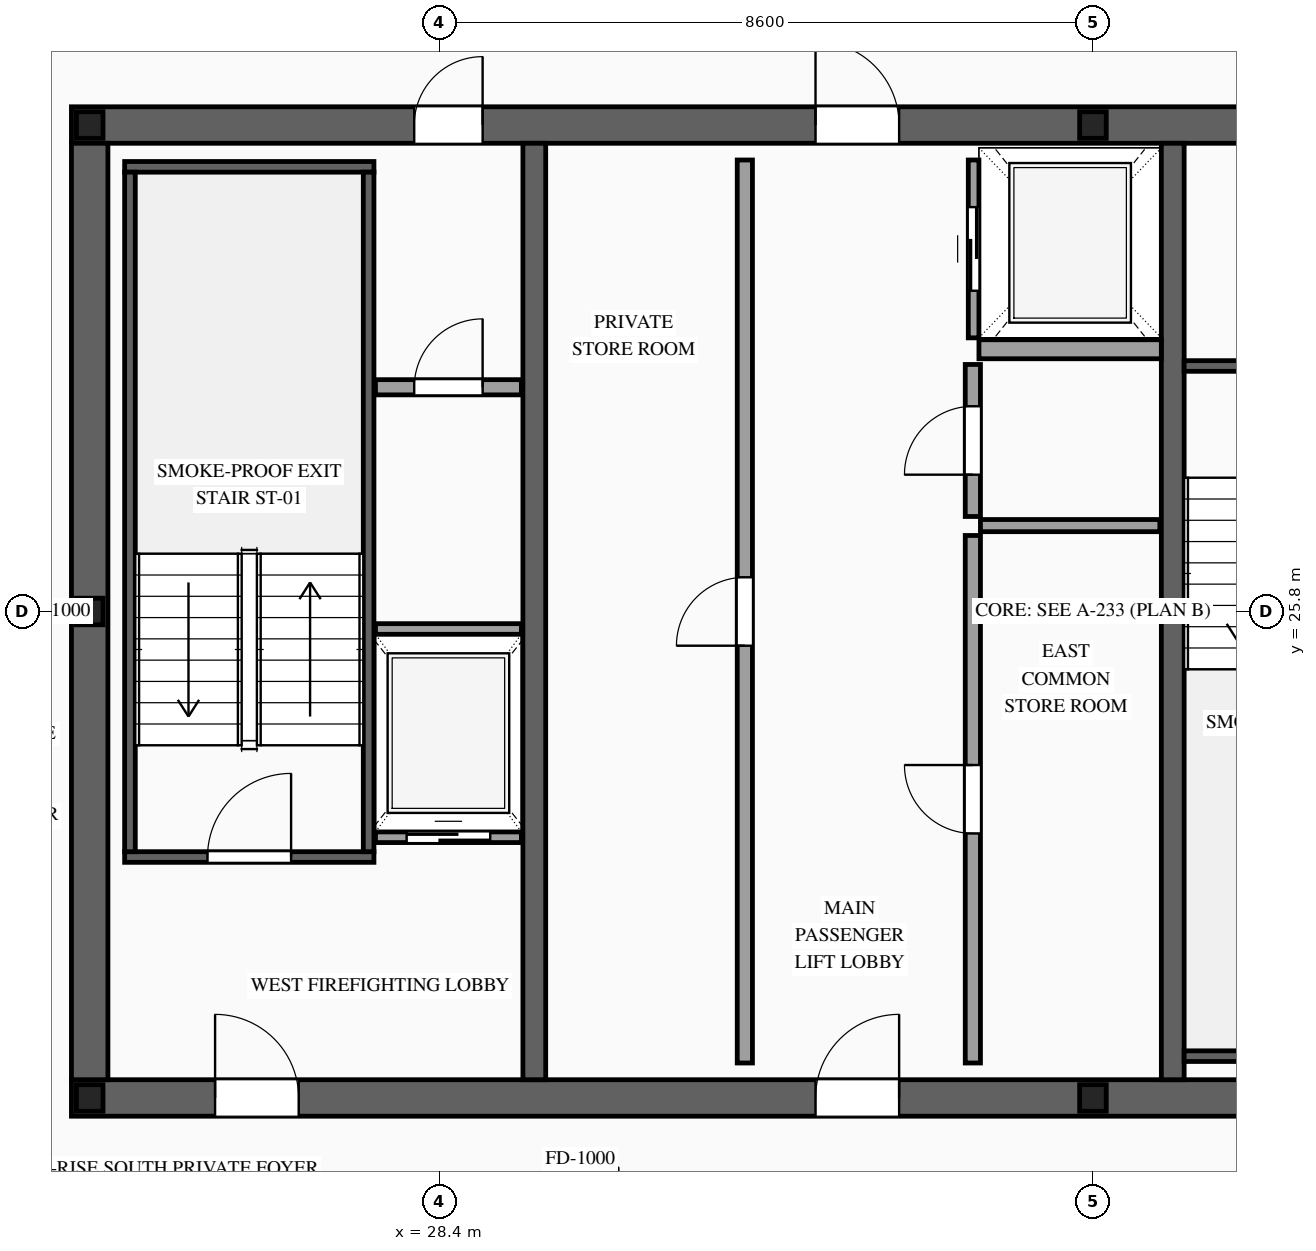
"""IFC4 building model, lengths in metres.
Left out: names, types, materials, properties, quantities, classifications, styles, units other than length and angle.
Written with IfcOpenShell. Run it as: python <this file> out.ifc"""

import sys

from ifc_helpers import new_model, si_unit, direction, frame, frame_2d, origin, origin_2d, place, context, subcontext, project, spatial, rectangle, i_section, extrude, source, transform, mapped, element, fill, save


model = new_model("IFC4")
c1 = context("Model", 3, precision=1e-05, world=origin(), true_north=direction((0.0, 1.0)))
c2 = subcontext(c1, "Body", "Model", "MODEL_VIEW")
j1 = project(units=[si_unit("LENGTHUNIT", "METRE"), si_unit("PLANEANGLEUNIT", "RADIAN")], contexts=[c1])
p1 = place(None, origin())
s1 = spatial("IfcSite", under=j1, at=p1, CompositionType="ELEMENT")
p2 = place(p1, origin())
s2 = spatial("IfcBuilding", under=s1, at=p2, CompositionType="ELEMENT")
p3 = place(p2, frame((0.0, 0.0, 328.7)))
s3 = spatial("IfcBuildingStorey", under=s2, at=p3, CompositionType="ELEMENT", Elevation=328.7)
p4 = place(p3, frame((23.56, 19.4, 0.0), z_axis=(0.0, 0.0, 1.0), x_axis=(1.0, 0.0, 0.0)))
e1 = element("IfcWall", 1, at=p4, inside=s3, PredefinedType="SHEAR", context=c2, shape_type="SweptSolid", body=[
    extrude(rectangle(XDim=26.88, YDim=0.48, at=frame_2d((13.44, 0.0))), origin(), (0.0, 0.0, 1.0), 3.5),
])
p5 = place(p4, frame((1.89, 0.0, 0.0)))
e2 = element("IfcOpeningElement", 2, at=p5, cuts=e1, PredefinedType="OPENING", context=c2, shape_type="SweptSolid", body=[
    extrude(rectangle(XDim=1.1, YDim=2.2, at=frame_2d((0.55, 1.1))), frame((0.0, 0.255, 0.0), z_axis=(0.0, -1.0, 0.0), x_axis=(1.0, 0.0, 0.0)), (0.0, 0.0, 1.0), 0.51),
])
p6 = place(p4, frame((9.79, 0.0, 0.0)))
e3 = element("IfcOpeningElement", 3, at=p6, cuts=e1, PredefinedType="OPENING", context=c2, shape_type="SweptSolid", body=[
    extrude(rectangle(XDim=1.1, YDim=2.2, at=frame_2d((0.55, 1.1))), frame((0.0, 0.255, 0.0), z_axis=(0.0, -1.0, 0.0), x_axis=(1.0, 0.0, 0.0)), (0.0, 0.0, 1.0), 0.51),
])
p7 = place(p4, frame((22.99, 0.0, 0.0)))
e4 = element("IfcOpeningElement", 4, at=p7, cuts=e1, PredefinedType="OPENING", context=c2, shape_type="SweptSolid", body=[
    extrude(rectangle(XDim=1.1, YDim=2.2, at=frame_2d((0.55, 1.1))), frame((0.0, 0.255, 0.0), z_axis=(0.0, -1.0, 0.0), x_axis=(1.0, 0.0, 0.0)), (0.0, 0.0, 1.0), 0.51),
])
p8 = place(p4, frame((19.61, 0.0, 0.0)))
e5 = element("IfcOpeningElement", 5, at=p8, cuts=e1, PredefinedType="OPENING", context=c2, shape_type="SweptSolid", body=[
    extrude(rectangle(XDim=0.9, YDim=2.15, at=frame_2d((0.45, 1.075))), frame((0.0, 0.255, 0.0), z_axis=(0.0, -1.0, 0.0), x_axis=(1.0, 0.0, 0.0)), (0.0, 0.0, 1.0), 0.51),
])
p9 = place(p4, frame((18.17, 0.0, 0.0)))
e6 = element("IfcOpeningElement", 6, at=p9, cuts=e1, PredefinedType="OPENING", context=c2, shape_type="SweptSolid", body=[
    extrude(rectangle(XDim=0.9, YDim=2.15, at=frame_2d((0.45, 1.075))), frame((0.0, 0.255, 0.0), z_axis=(0.0, -1.0, 0.0), x_axis=(1.0, 0.0, 0.0)), (0.0, 0.0, 1.0), 0.51),
])
p10 = place(p3, frame((23.56, 32.2, 0.0), z_axis=(0.0, 0.0, 1.0), x_axis=(1.0, 0.0, 0.0)))
e7 = element("IfcWall", 7, at=p10, inside=s3, PredefinedType="SHEAR", context=c2, shape_type="SweptSolid", body=[
    extrude(rectangle(XDim=26.88, YDim=0.48, at=frame_2d((13.44, 0.0))), origin(), (0.0, 0.0, 1.0), 3.5),
])
p11 = place(p10, frame((4.51, 0.0, 0.0)))
e8 = element("IfcOpeningElement", 8, at=p11, cuts=e7, PredefinedType="OPENING", context=c2, shape_type="SweptSolid", body=[
    extrude(rectangle(XDim=0.9, YDim=2.15, at=frame_2d((0.45, 1.075))), frame((0.0, 0.255, 0.0), z_axis=(0.0, -1.0, 0.0), x_axis=(1.0, 0.0, 0.0)), (0.0, 0.0, 1.0), 0.51),
])
p12 = place(p10, frame((9.79, 0.0, 0.0)))
e9 = element("IfcOpeningElement", 9, at=p12, cuts=e7, PredefinedType="OPENING", context=c2, shape_type="SweptSolid", body=[
    extrude(rectangle(XDim=1.1, YDim=2.2, at=frame_2d((0.55, 1.1))), frame((0.0, 0.255, 0.0), z_axis=(0.0, -1.0, 0.0), x_axis=(1.0, 0.0, 0.0)), (0.0, 0.0, 1.0), 0.51),
])
p13 = place(p10, frame((15.64, 0.0, 0.0)))
e10 = element("IfcOpeningElement", 10, at=p13, cuts=e7, PredefinedType="OPENING", context=c2, shape_type="SweptSolid", body=[
    extrude(rectangle(XDim=1.1, YDim=2.2, at=frame_2d((0.55, 1.1))), frame((0.0, 0.255, 0.0), z_axis=(0.0, -1.0, 0.0), x_axis=(1.0, 0.0, 0.0)), (0.0, 0.0, 1.0), 0.51),
])
p14 = place(p10, frame((18.74, 0.0, 0.0)))
e11 = element("IfcOpeningElement", 11, at=p14, cuts=e7, PredefinedType="OPENING", context=c2, shape_type="SweptSolid", body=[
    extrude(rectangle(XDim=1.1, YDim=2.2, at=frame_2d((0.55, 1.1))), frame((0.0, 0.255, 0.0), z_axis=(0.0, -1.0, 0.0), x_axis=(1.0, 0.0, 0.0)), (0.0, 0.0, 1.0), 0.51),
])
m1 = source(origin(), c2, "Body", "SweptSolid", [
    extrude(rectangle(XDim=12.32, YDim=0.48, at=frame_2d((6.16, 0.0))), origin(), (0.0, 0.0, 1.0), 3.5),
])
p15 = place(p3, frame((23.8, 19.64, 0.0), z_axis=(0.0, 0.0, 1.0), x_axis=(0.0, 1.0, 0.0)))
e12 = element("IfcWall", 12, at=p15, inside=s3, PredefinedType="SHEAR", context=c2, shape_type="MappedRepresentation", body=[
    mapped(m1, transform((0.0, 0.0, 0.0), scale=1.0)),
])
m2 = source(origin(), c2, "Body", "SweptSolid", [
    extrude(rectangle(XDim=12.32, YDim=0.3, at=frame_2d((6.16, 0.0))), origin(), (0.0, 0.0, 1.0), 3.5),
])
for number, where, z_axis, x_axis in (
    (13, (29.65, 19.64, 0.0), (0.0, 0.0, 1.0), (0.0, 1.0, 0.0)),
    (14, (38.05, 19.64, 0.0), (0.0, 0.0, 1.0), (0.0, 1.0, 0.0)),
):
    element("IfcWall", number, at=place(p3, frame(where, z_axis=z_axis, x_axis=x_axis)), inside=s3, PredefinedType="SOLIDWALL", context=c2, shape_type="MappedRepresentation", body=[
        mapped(m2, transform((0.0, 0.0, 0.0), scale=1.0)),
    ])
m3 = source(origin(), c2, "Body", "SweptSolid", [
    extrude(i_section(OverallWidth=0.35, OverallDepth=0.35, WebThickness=0.012, FlangeThickness=0.019, at=origin_2d()), origin(), (0.0, 0.0, 1.0), 3.5),
])
for number, where, z_axis, x_axis in (
    (15, (23.8, 19.4, 0.0), (0.0, 0.0, 1.0), (1.0, 0.0, 0.0)),
    (16, (37.0, 19.4, 0.0), (0.0, 0.0, 1.0), (1.0, 0.0, 0.0)),
    (17, (23.8, 25.8, 0.0), (0.0, 0.0, 1.0), (1.0, 0.0, 0.0)),
    (18, (23.8, 32.2, 0.0), (0.0, 0.0, 1.0), (1.0, 0.0, 0.0)),
    (19, (37.0, 32.2, 0.0), (0.0, 0.0, 1.0), (1.0, 0.0, 0.0)),
):
    element("IfcColumn", number, at=place(p3, frame(where, z_axis=z_axis, x_axis=x_axis)), inside=s3, PredefinedType="COLUMN", context=c2, shape_type="MappedRepresentation", body=[
        mapped(m3, transform((0.0, 0.0, 0.0), scale=1.0)),
    ])
p16 = place(p3, frame((27.56, 22.83, 0.0), z_axis=(0.0, 0.0, 1.0), x_axis=(1.0, 0.0, 0.0)))
e20 = element("IfcWall", 20, at=p16, inside=s3, PredefinedType="SOLIDWALL", context=c2, shape_type="SweptSolid", body=[
    extrude(rectangle(XDim=1.92, YDim=0.14, at=frame_2d((0.96, 0.0))), origin(), (0.0, 0.0, 1.0), 3.28),
])
p17 = place(p16, frame((0.41, 0.0, 0.0)))
e21 = element("IfcOpeningElement", 21, at=p17, cuts=e20, PredefinedType="OPENING", context=c2, shape_type="SweptSolid", body=[
    extrude(rectangle(XDim=1.1, YDim=2.2, at=frame_2d((0.55, 1.1))), frame((0.0, 0.085, 0.0), z_axis=(0.0, -1.0, 0.0), x_axis=(1.0, 0.0, 0.0)), (0.0, 0.0, 1.0), 0.17),
])
m4 = source(origin(), c2, "Body", "SweptSolid", [
    extrude(rectangle(XDim=1.92, YDim=0.14, at=frame_2d((0.96, 0.0))), origin(), (0.0, 0.0, 1.0), 3.28),
])
p18 = place(p3, frame((27.56, 25.57, 0.0), z_axis=(0.0, 0.0, 1.0), x_axis=(1.0, 0.0, 0.0)))
e22 = element("IfcWall", 22, at=p18, inside=s3, PredefinedType="SOLIDWALL", context=c2, shape_type="MappedRepresentation", body=[
    mapped(m4, transform((0.0, 0.0, 0.0), scale=1.0)),
])
p19 = place(p3, frame((35.43, 29.4, 0.0), z_axis=(0.0, 0.0, 1.0), x_axis=(0.0, 1.0, 0.0)))
e23 = element("IfcWall", 23, at=p19, inside=s3, PredefinedType="SOLIDWALL", context=c2, shape_type="SweptSolid", body=[
    extrude(rectangle(XDim=2.34, YDim=0.14, at=frame_2d((1.17, 0.0))), origin(), (0.0, 0.0, 1.0), 3.28),
])
p20 = place(p19, frame((0.62, 0.0, 0.0)))
e24 = element("IfcOpeningElement", 24, at=p20, cuts=e23, PredefinedType="OPENING", context=c2, shape_type="SweptSolid", body=[
    extrude(rectangle(XDim=1.1, YDim=2.2, at=frame_2d((0.55, 1.1))), frame((0.0, 0.085, 0.0), z_axis=(0.0, -1.0, 0.0), x_axis=(1.0, 0.0, 0.0)), (0.0, 0.0, 1.0), 0.17),
])
m5 = source(origin(), c2, "Body", "SweptSolid", [
    extrude(rectangle(XDim=2.4, YDim=0.25, at=frame_2d((1.2, 0.0))), origin(), (0.0, 0.0, 1.0), 3.28),
])
p21 = place(p3, frame((35.5, 29.25, 0.0), z_axis=(0.0, 0.0, 1.0), x_axis=(1.0, 0.0, 0.0)))
e25 = element("IfcWall", 25, at=p21, inside=s3, PredefinedType="SOLIDWALL", context=c2, shape_type="MappedRepresentation", body=[
    mapped(m5, transform((0.0, 0.0, 0.0), scale=1.0)),
])
p22 = place(p3, frame((24.26, 22.57, 0.0), z_axis=(0.0, 0.0, 1.0), x_axis=(1.0, 0.0, 0.0)))
e26 = element("IfcWall", 26, at=p22, inside=s3, PredefinedType="SOLIDWALL", context=c2, shape_type="SweptSolid", body=[
    extrude(rectangle(XDim=3.28, YDim=0.14, at=frame_2d((1.64, 0.0))), origin(), (0.0, 0.0, 1.0), 3.28),
])
p23 = place(p22, frame((1.09, 0.0, 0.0)))
e27 = element("IfcOpeningElement", 27, at=p23, cuts=e26, PredefinedType="OPENING", context=c2, shape_type="SweptSolid", body=[
    extrude(rectangle(XDim=1.1, YDim=2.2, at=frame_2d((0.55, 1.1))), frame((0.0, 0.085, 0.0), z_axis=(0.0, -1.0, 0.0), x_axis=(1.0, 0.0, 0.0)), (0.0, 0.0, 1.0), 0.17),
])
m6 = source(origin(), c2, "Body", "SweptSolid", [
    extrude(rectangle(XDim=3.28, YDim=0.14, at=frame_2d((1.64, 0.0))), origin(), (0.0, 0.0, 1.0), 3.28),
])
p24 = place(p3, frame((24.26, 31.65, 0.0), z_axis=(0.0, 0.0, 1.0), x_axis=(1.0, 0.0, 0.0)))
e28 = element("IfcWall", 28, at=p24, inside=s3, PredefinedType="SOLIDWALL", context=c2, shape_type="MappedRepresentation", body=[
    mapped(m6, transform((0.0, 0.0, 0.0), scale=1.0)),
])
m7 = source(origin(), c2, "Body", "SweptSolid", [
    extrude(rectangle(XDim=8.94, YDim=0.14, at=frame_2d((4.47, 0.0))), origin(), (0.0, 0.0, 1.0), 3.28),
])
for number, where, z_axis, x_axis in (
    (29, (24.33, 22.64, 0.0), (0.0, 0.0, 1.0), (0.0, 1.0, 0.0)),
    (30, (27.47, 22.64, 0.0), (0.0, 0.0, 1.0), (0.0, 1.0, 0.0)),
):
    element("IfcWall", number, at=place(p3, frame(where, z_axis=z_axis, x_axis=x_axis)), inside=s3, PredefinedType="SOLIDWALL", context=c2, shape_type="MappedRepresentation", body=[
        mapped(m7, transform((0.0, 0.0, 0.0), scale=1.0)),
    ])
p25 = place(p3, frame((38.2, 29.03, 0.0), z_axis=(0.0, 0.0, 1.0), x_axis=(1.0, 0.0, 0.0)))
e31 = element("IfcWall", 31, at=p25, inside=s3, PredefinedType="SOLIDWALL", context=c2, shape_type="SweptSolid", body=[
    extrude(rectangle(XDim=3.14, YDim=0.14, at=frame_2d((1.57, 0.0))), origin(), (0.0, 0.0, 1.0), 3.28),
])
p26 = place(p25, frame((1.02, 0.0, 0.0)))
e32 = element("IfcOpeningElement", 32, at=p26, cuts=e31, PredefinedType="OPENING", context=c2, shape_type="SweptSolid", body=[
    extrude(rectangle(XDim=1.1, YDim=2.2, at=frame_2d((0.55, 1.1))), frame((0.0, 0.085, 0.0), z_axis=(0.0, -1.0, 0.0), x_axis=(1.0, 0.0, 0.0)), (0.0, 0.0, 1.0), 0.17),
])
m8 = source(origin(), c2, "Body", "SweptSolid", [
    extrude(rectangle(XDim=3.14, YDim=0.14, at=frame_2d((1.57, 0.0))), origin(), (0.0, 0.0, 1.0), 3.28),
])
p27 = place(p3, frame((38.2, 19.95, 0.0), z_axis=(0.0, 0.0, 1.0), x_axis=(1.0, 0.0, 0.0)))
e33 = element("IfcWall", 33, at=p27, inside=s3, PredefinedType="SOLIDWALL", context=c2, shape_type="MappedRepresentation", body=[
    mapped(m8, transform((0.0, 0.0, 0.0), scale=1.0)),
])
p28 = place(p3, frame((27.56, 28.75, 0.0), z_axis=(0.0, 0.0, 1.0), x_axis=(1.0, 0.0, 0.0)))
e34 = element("IfcWall", 34, at=p28, inside=s3, PredefinedType="PARTITIONING", context=c2, shape_type="SweptSolid", body=[
    extrude(rectangle(XDim=1.92, YDim=0.2, at=frame_2d((0.96, 0.0))), origin(), (0.0, 0.0, 1.0), 3.28),
])
p29 = place(p28, frame((0.51, 0.0, 0.0)))
e35 = element("IfcOpeningElement", 35, at=p29, cuts=e34, PredefinedType="OPENING", context=c2, shape_type="SweptSolid", body=[
    extrude(rectangle(XDim=0.9, YDim=2.15, at=frame_2d((0.45, 1.075))), frame((0.0, 0.115, 0.0), z_axis=(0.0, -1.0, 0.0), x_axis=(1.0, 0.0, 0.0)), (0.0, 0.0, 1.0), 0.23),
])
p30 = place(p3, frame((32.42, 19.86, 0.0), z_axis=(0.0, 0.0, 1.0), x_axis=(0.0, 1.0, 0.0)))
e36 = element("IfcWall", 36, at=p30, inside=s3, PredefinedType="PARTITIONING", context=c2, shape_type="SweptSolid", body=[
    extrude(rectangle(XDim=11.88, YDim=0.2, at=frame_2d((5.94, 0.0))), origin(), (0.0, 0.0, 1.0), 3.28),
])
p31 = place(p30, frame((5.49, 0.0, 0.0)))
e37 = element("IfcOpeningElement", 37, at=p31, cuts=e36, PredefinedType="OPENING", context=c2, shape_type="SweptSolid", body=[
    extrude(rectangle(XDim=0.9, YDim=2.15, at=frame_2d((0.45, 1.075))), frame((0.0, 0.115, 0.0), z_axis=(0.0, -1.0, 0.0), x_axis=(1.0, 0.0, 0.0)), (0.0, 0.0, 1.0), 0.23),
])
p32 = place(p3, frame((35.42, 19.86, 0.0), z_axis=(0.0, 0.0, 1.0), x_axis=(0.0, 1.0, 0.0)))
e38 = element("IfcWall", 38, at=p32, inside=s3, PredefinedType="PARTITIONING", context=c2, shape_type="SweptSolid", body=[
    extrude(rectangle(XDim=6.94, YDim=0.2, at=frame_2d((3.47, 0.0))), origin(), (0.0, 0.0, 1.0), 3.28),
])
p33 = place(p32, frame((3.02, 0.0, 0.0)))
e39 = element("IfcOpeningElement", 39, at=p33, cuts=e38, PredefinedType="OPENING", context=c2, shape_type="SweptSolid", body=[
    extrude(rectangle(XDim=0.9, YDim=2.15, at=frame_2d((0.45, 1.075))), frame((0.0, 0.115, 0.0), z_axis=(0.0, -1.0, 0.0), x_axis=(1.0, 0.0, 0.0)), (0.0, 0.0, 1.0), 0.23),
])
p34 = place(p3, frame((35.42, 27.05, 0.0), z_axis=(0.0, 0.0, 1.0), x_axis=(0.0, 1.0, 0.0)))
e40 = element("IfcWall", 40, at=p34, inside=s3, PredefinedType="PARTITIONING", context=c2, shape_type="SweptSolid", body=[
    extrude(rectangle(XDim=2.0, YDim=0.2, at=frame_2d((1.0, 0.0))), origin(), (0.0, 0.0, 1.0), 3.28),
])
p35 = place(p34, frame((0.55, 0.0, 0.0)))
e41 = element("IfcOpeningElement", 41, at=p35, cuts=e40, PredefinedType="OPENING", context=c2, shape_type="SweptSolid", body=[
    extrude(rectangle(XDim=0.9, YDim=2.15, at=frame_2d((0.45, 1.075))), frame((0.0, 0.115, 0.0), z_axis=(0.0, -1.0, 0.0), x_axis=(1.0, 0.0, 0.0)), (0.0, 0.0, 1.0), 0.23),
])
m9 = source(origin(), c2, "Body", "SweptSolid", [
    extrude(rectangle(XDim=2.36, YDim=0.16, at=frame_2d((1.18, 0.0))), origin(), (0.0, 0.0, 1.0), 3.28),
])
p36 = place(p3, frame((35.52, 26.93, 0.0), z_axis=(0.0, 0.0, 1.0), x_axis=(1.0, 0.0, 0.0)))
e42 = element("IfcWall", 42, at=p36, inside=s3, PredefinedType="PARTITIONING", context=c2, shape_type="MappedRepresentation", body=[
    mapped(m9, transform((0.0, 0.0, 0.0), scale=1.0)),
])
m10 = source(origin(), c2, "Body", "SweptSolid", [
    extrude(rectangle(XDim=1.1, YDim=2.2, at=frame_2d((0.55, 1.1))), frame((0.0, 0.025, 0.0), z_axis=(0.0, -1.0, 0.0), x_axis=(1.0, 0.0, 0.0)), (0.0, 0.0, 1.0), 0.05),
])
p37 = place(p17, origin())
e43 = element("IfcDoor", 43, at=p37, inside=s3, OperationType="SLIDING_TO_LEFT", PredefinedType="DOOR", context=c2, shape_type="MappedRepresentation", body=[
    mapped(m10, transform((0.0, 0.0, 0.0), scale=1.0)),
])
fill(e21, e43)
p38 = place(p20, origin())
e44 = element("IfcDoor", 44, at=p38, inside=s3, OperationType="SLIDING_TO_RIGHT", PredefinedType="DOOR", context=c2, shape_type="MappedRepresentation", body=[
    mapped(m10, transform((0.0, 0.0, 0.0), scale=1.0)),
])
fill(e24, e44)
m11 = source(origin(), c2, "Body", "SweptSolid", [
    extrude(rectangle(XDim=1.1, YDim=2.2, at=frame_2d((0.55, 1.1))), frame((0.0, 0.025, 0.0), z_axis=(0.0, -1.0, 0.0), x_axis=(1.0, 0.0, 0.0)), (0.0, 0.0, 1.0), 0.05),
])
p39 = place(p23, origin())
e45 = element("IfcDoor", 45, at=p39, inside=s3, OperationType="SINGLE_SWING_RIGHT", PredefinedType="DOOR", context=c2, shape_type="MappedRepresentation", body=[
    mapped(m11, transform((0.0, 0.0, 0.0), scale=1.0)),
])
fill(e27, e45)
p40 = place(p5, origin())
e46 = element("IfcDoor", 46, at=p40, inside=s3, OperationType="SINGLE_SWING_LEFT", PredefinedType="DOOR", context=c2, shape_type="MappedRepresentation", body=[
    mapped(m11, transform((0.0, 0.0, 0.0), scale=1.0)),
])
fill(e2, e46)
p41 = place(p6, origin())
e47 = element("IfcDoor", 47, at=p41, inside=s3, OperationType="SINGLE_SWING_RIGHT", PredefinedType="DOOR", context=c2, shape_type="MappedRepresentation", body=[
    mapped(m11, transform((0.0, 0.0, 0.0), scale=1.0)),
])
fill(e3, e47)
m12 = source(origin(), c2, "Body", "SweptSolid", [
    extrude(rectangle(XDim=0.9, YDim=2.15, at=frame_2d((0.45, 1.075))), frame((0.0, 0.025, 0.0), z_axis=(0.0, -1.0, 0.0), x_axis=(1.0, 0.0, 0.0)), (0.0, 0.0, 1.0), 0.05),
])
p42 = place(p11, origin())
e48 = element("IfcDoor", 48, at=p42, inside=s3, OperationType="SINGLE_SWING_RIGHT", PredefinedType="DOOR", context=c2, shape_type="MappedRepresentation", body=[
    mapped(m12, transform((0.0, 0.0, 0.0), scale=1.0)),
])
fill(e8, e48)
p43 = place(p12, origin())
e49 = element("IfcDoor", 49, at=p43, inside=s3, OperationType="SINGLE_SWING_LEFT", PredefinedType="DOOR", context=c2, shape_type="MappedRepresentation", body=[
    mapped(m11, transform((0.0, 0.0, 0.0), scale=1.0)),
])
fill(e9, e49)
p44 = place(p29, origin())
e50 = element("IfcDoor", 50, at=p44, inside=s3, OperationType="SINGLE_SWING_RIGHT", PredefinedType="DOOR", context=c2, shape_type="MappedRepresentation", body=[
    mapped(m12, transform((0.0, 0.0, 0.0), scale=1.0)),
])
fill(e35, e50)
p45 = place(p31, origin())
e51 = element("IfcDoor", 51, at=p45, inside=s3, OperationType="SINGLE_SWING_LEFT", PredefinedType="DOOR", context=c2, shape_type="MappedRepresentation", body=[
    mapped(m12, transform((0.0, 0.0, 0.0), scale=1.0)),
])
fill(e37, e51)
p46 = place(p33, origin())
e52 = element("IfcDoor", 52, at=p46, inside=s3, OperationType="SINGLE_SWING_RIGHT", PredefinedType="DOOR", context=c2, shape_type="MappedRepresentation", body=[
    mapped(m12, transform((0.0, 0.0, 0.0), scale=1.0)),
])
fill(e39, e52)
p47 = place(p35, origin())
e53 = element("IfcDoor", 53, at=p47, inside=s3, OperationType="SINGLE_SWING_LEFT", PredefinedType="DOOR", context=c2, shape_type="MappedRepresentation", body=[
    mapped(m12, transform((0.0, 0.0, 0.0), scale=1.0)),
])
fill(e41, e53)
save(model, sys.argv[1])
